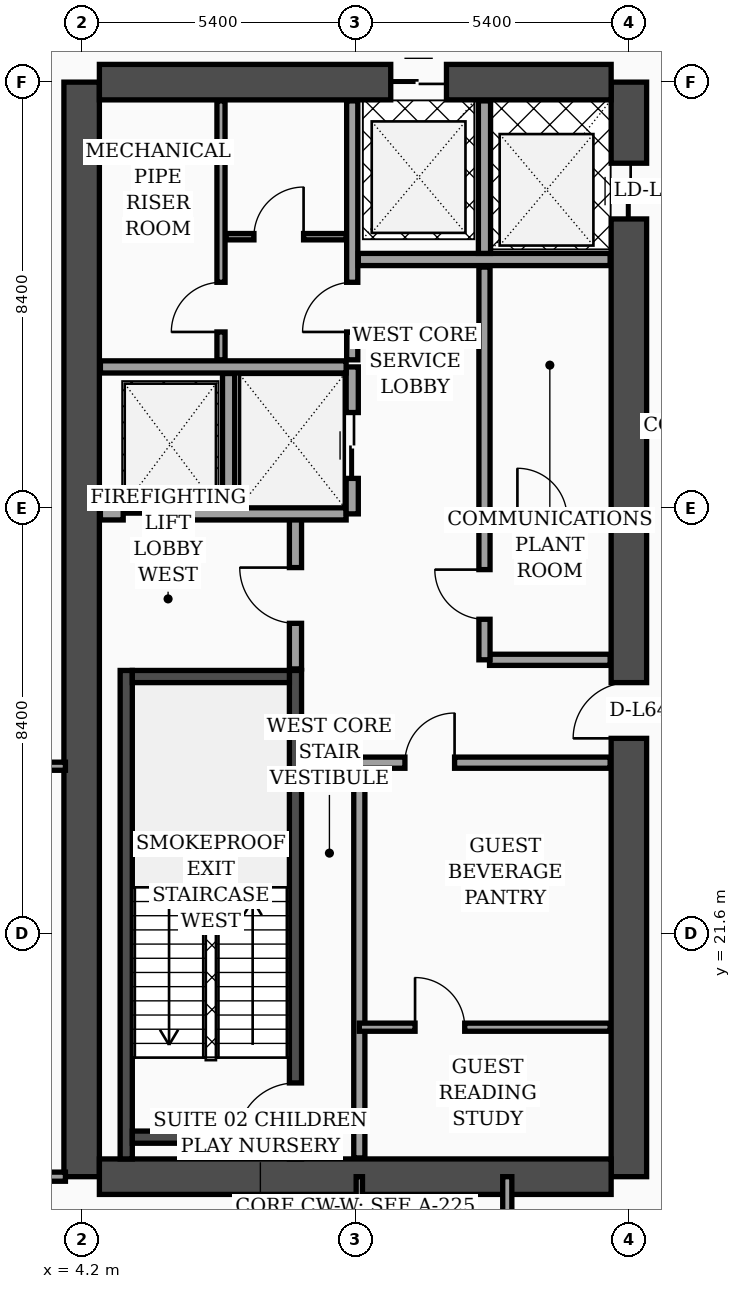
"""IFC4 building model, lengths in metres.
Left out: names, types, materials, properties, quantities, classifications, styles, units other than length and angle.
Written with IfcOpenShell. Run it as: python <this file> out.ifc"""

import sys

from ifc_helpers import new_model, si_unit, direction, frame, frame_2d, origin, place, context, subcontext, project, spatial, rectangle, extrude, element, fill, save


model = new_model("IFC4")
c1 = context("Model", 3, precision=1e-05, world=origin(), true_north=direction((0.0, 1.0)))
c2 = subcontext(c1, "Body", "Model", "MODEL_VIEW")
j1 = project(units=[si_unit("LENGTHUNIT", "METRE"), si_unit("PLANEANGLEUNIT", "RADIAN")], contexts=[c1])
p1 = place(None, origin())
s1 = spatial("IfcSite", under=j1, at=p1, CompositionType="ELEMENT")
p2 = place(p1, origin())
s2 = spatial("IfcBuilding", under=s1, at=p2, CompositionType="ELEMENT")
p3 = place(p2, frame((0.0, 0.0, 259.0)))
s3 = spatial("IfcBuildingStorey", under=s2, at=p3, CompositionType="ELEMENT", Elevation=259.0)
p4 = place(p3, frame((4.2, 16.8, 0.0), z_axis=(0.0, 0.0, 1.0), x_axis=(0.0, 1.0, 0.0)))
e1 = element("IfcWall", 1, at=p4, inside=s3, PredefinedType="SHEAR", context=c2, shape_type="SweptSolid", body=[
    extrude(rectangle(XDim=21.6, YDim=0.7, at=frame_2d((10.8, 0.0))), origin(), (0.0, 0.0, 1.0), 4.05),
])
p5 = place(p3, frame((15.0, 16.8, 0.0), z_axis=(0.0, 0.0, 1.0), x_axis=(0.0, 1.0, 0.0)))
e2 = element("IfcWall", 2, at=p5, inside=s3, PredefinedType="SHEAR", context=c2, shape_type="SweptSolid", body=[
    extrude(rectangle(XDim=21.6, YDim=0.7, at=frame_2d((10.8, 0.0))), origin(), (0.0, 0.0, 1.0), 4.05),
])
p6 = place(p5, frame((8.65, 0.0, 0.0)))
e3 = element("IfcOpeningElement", 3, at=p6, cuts=e2, PredefinedType="OPENING", context=c2, shape_type="SweptSolid", body=[
    extrude(rectangle(XDim=1.1, YDim=2.2, at=frame_2d((0.55, 1.1))), frame((0.0, 0.36, 0.0), z_axis=(0.0, -1.0, 0.0), x_axis=(1.0, 0.0, 0.0)), (0.0, 0.0, 1.0), 0.72),
])
p7 = place(p5, frame((18.9, 0.0, 0.0)))
e4 = element("IfcOpeningElement", 4, at=p7, cuts=e2, PredefinedType="OPENING", context=c2, shape_type="SweptSolid", body=[
    extrude(rectangle(XDim=1.1, YDim=2.2, at=frame_2d((0.55, 1.1))), frame((0.0, 0.36, 0.0), z_axis=(0.0, -1.0, 0.0), x_axis=(1.0, 0.0, 0.0)), (0.0, 0.0, 1.0), 0.72),
])
p8 = place(p3, frame((4.55, 38.4, 0.0), z_axis=(0.0, 0.0, 1.0), x_axis=(1.0, 0.0, 0.0)))
e5 = element("IfcWall", 5, at=p8, inside=s3, PredefinedType="SHEAR", context=c2, shape_type="SweptSolid", body=[
    extrude(rectangle(XDim=10.1, YDim=0.7, at=frame_2d((5.05, 0.0))), origin(), (0.0, 0.0, 1.0), 4.05),
])
p9 = place(p8, frame((5.75, 0.0, 0.0)))
e6 = element("IfcOpeningElement", 6, at=p9, cuts=e5, PredefinedType="OPENING", context=c2, shape_type="SweptSolid", body=[
    extrude(rectangle(XDim=1.1, YDim=2.2, at=frame_2d((0.55, 1.1))), frame((0.0, 0.36, 0.0), z_axis=(0.0, -1.0, 0.0), x_axis=(1.0, 0.0, 0.0)), (0.0, 0.0, 1.0), 0.72),
])
p10 = place(p3, frame((4.55, 16.8, 0.0), z_axis=(0.0, 0.0, 1.0), x_axis=(1.0, 0.0, 0.0)))
e7 = element("IfcWall", 7, at=p10, inside=s3, PredefinedType="SHEAR", context=c2, shape_type="SweptSolid", body=[
    extrude(rectangle(XDim=10.1, YDim=0.7, at=frame_2d((5.05, 0.0))), origin(), (0.0, 0.0, 1.0), 4.05),
])
p11 = place(p3, frame((5.08, 17.15, 0.0), z_axis=(0.0, 0.0, 1.0), x_axis=(0.0, 1.0, 0.0)))
e8 = element("IfcWall", 8, at=p11, inside=s3, PredefinedType="SOLIDWALL", context=c2, shape_type="SweptSolid", body=[
    extrude(rectangle(XDim=9.64, YDim=0.24, at=frame_2d((4.82, 0.0))), origin(), (0.0, 0.0, 1.0), 4.05),
])
p12 = place(p3, frame((8.42, 17.15, 0.0), z_axis=(0.0, 0.0, 1.0), x_axis=(0.0, 1.0, 0.0)))
e9 = element("IfcWall", 9, at=p12, inside=s3, PredefinedType="SOLIDWALL", context=c2, shape_type="SweptSolid", body=[
    extrude(rectangle(XDim=9.64, YDim=0.24, at=frame_2d((4.82, 0.0))), origin(), (0.0, 0.0, 1.0), 4.05),
])
p13 = place(p12, frame((0.35, 0.0, 0.0)))
e10 = element("IfcOpeningElement", 10, at=p13, cuts=e9, PredefinedType="OPENING", context=c2, shape_type="SweptSolid", body=[
    extrude(rectangle(XDim=1.15, YDim=2.2, at=frame_2d((0.575, 1.1))), frame((0.0, 0.13, 0.0), z_axis=(0.0, -1.0, 0.0), x_axis=(1.0, 0.0, 0.0)), (0.0, 0.0, 1.0), 0.26),
])
for number, where, z_axis, x_axis in (
    (11, (5.2, 17.58, 0.0), (0.0, 0.0, 1.0), (1.0, 0.0, 0.0)),
    (12, (5.2, 26.67, 0.0), (0.0, 0.0, 1.0), (1.0, 0.0, 0.0)),
):
    element("IfcWall", number, at=place(p3, frame(where, z_axis=z_axis, x_axis=x_axis)), inside=s3, PredefinedType="SOLIDWALL", context=c2, shape_type="SweptSolid", body=[
        extrude(rectangle(XDim=3.1, YDim=0.24, at=frame_2d((1.55, 0.0))), origin(), (0.0, 0.0, 1.0), 4.05),
    ])
p14 = place(p3, frame((8.42, 26.82, 0.0), z_axis=(0.0, 0.0, 1.0), x_axis=(0.0, 1.0, 0.0)))
e13 = element("IfcWall", 13, at=p14, inside=s3, PredefinedType="SOLIDWALL", context=c2, shape_type="SweptSolid", body=[
    extrude(rectangle(XDim=3.0, YDim=0.24, at=frame_2d((1.5, 0.0))), origin(), (0.0, 0.0, 1.0), 4.05),
])
p15 = place(p14, frame((0.9, 0.0, 0.0)))
e14 = element("IfcOpeningElement", 14, at=p15, cuts=e13, PredefinedType="OPENING", context=c2, shape_type="SweptSolid", body=[
    extrude(rectangle(XDim=1.1, YDim=2.2, at=frame_2d((0.55, 1.1))), frame((0.0, 0.13, 0.0), z_axis=(0.0, -1.0, 0.0), x_axis=(1.0, 0.0, 0.0)), (0.0, 0.0, 1.0), 0.26),
])
p16 = place(p3, frame((4.57, 29.88, 0.0), z_axis=(0.0, 0.0, 1.0), x_axis=(1.0, 0.0, 0.0)))
e15 = element("IfcWall", 15, at=p16, inside=s3, PredefinedType="SOLIDWALL", context=c2, shape_type="SweptSolid", body=[
    extrude(rectangle(XDim=4.85, YDim=0.24, at=frame_2d((2.425, 0.0))), origin(), (0.0, 0.0, 1.0), 4.05),
])
p17 = place(p16, frame((0.45, 0.0, 0.0)))
e16 = element("IfcOpeningElement", 16, at=p17, cuts=e15, PredefinedType="OPENING", context=c2, shape_type="SweptSolid", body=[
    extrude(rectangle(XDim=1.3, YDim=2.35, at=frame_2d((0.65, 1.175))), frame((0.0, 0.13, 0.0), z_axis=(0.0, -1.0, 0.0), x_axis=(1.0, 0.0, 0.0)), (0.0, 0.0, 1.0), 0.26),
])
p18 = place(p3, frame((7.1, 30.02, 0.0), z_axis=(0.0, 0.0, 1.0), x_axis=(0.0, 1.0, 0.0)))
e17 = element("IfcWall", 17, at=p18, inside=s3, PredefinedType="SOLIDWALL", context=c2, shape_type="SweptSolid", body=[
    extrude(rectangle(XDim=2.63, YDim=0.24, at=frame_2d((1.315, 0.0))), origin(), (0.0, 0.0, 1.0), 4.05),
])
p19 = place(p3, frame((9.54, 29.88, 0.0), z_axis=(0.0, 0.0, 1.0), x_axis=(0.0, 1.0, 0.0)))
e18 = element("IfcWall", 18, at=p19, inside=s3, PredefinedType="SOLIDWALL", context=c2, shape_type="SweptSolid", body=[
    extrude(rectangle(XDim=2.9, YDim=0.24, at=frame_2d((1.45, 0.0))), origin(), (0.0, 0.0, 1.0), 4.05),
])
p20 = place(p19, frame((0.7, 0.0, 0.0)))
e19 = element("IfcOpeningElement", 19, at=p20, cuts=e18, PredefinedType="OPENING", context=c2, shape_type="SweptSolid", body=[
    extrude(rectangle(XDim=1.3, YDim=2.35, at=frame_2d((0.65, 1.175))), frame((0.0, 0.13, 0.0), z_axis=(0.0, -1.0, 0.0), x_axis=(1.0, 0.0, 0.0)), (0.0, 0.0, 1.0), 0.26),
])
p21 = place(p3, frame((4.57, 32.78, 0.0), z_axis=(0.0, 0.0, 1.0), x_axis=(1.0, 0.0, 0.0)))
e20 = element("IfcWall", 20, at=p21, inside=s3, PredefinedType="SOLIDWALL", context=c2, shape_type="SweptSolid", body=[
    extrude(rectangle(XDim=4.85, YDim=0.24, at=frame_2d((2.425, 0.0))), origin(), (0.0, 0.0, 1.0), 3.7),
])
p22 = place(p3, frame((9.68, 17.17, 0.0), z_axis=(0.0, 0.0, 1.0), x_axis=(0.0, 1.0, 0.0)))
e21 = element("IfcWall", 21, at=p22, inside=s3, PredefinedType="SOLIDWALL", context=c2, shape_type="SweptSolid", body=[
    extrude(rectangle(XDim=7.83, YDim=0.22, at=frame_2d((3.915, 0.0))), origin(), (0.0, 0.0, 1.0), 4.05),
])
p23 = place(p3, frame((6.95, 32.92, 0.0), z_axis=(0.0, 0.0, 1.0), x_axis=(0.0, 1.0, 0.0)))
e22 = element("IfcWall", 22, at=p23, inside=s3, PredefinedType="PARTITIONING", context=c2, shape_type="SweptSolid", body=[
    extrude(rectangle(XDim=5.11, YDim=0.16, at=frame_2d((2.555, 0.0))), origin(), (0.0, 0.0, 1.0), 4.05),
])
p24 = place(p23, frame((0.55, 0.0, 0.0)))
e23 = element("IfcOpeningElement", 23, at=p24, cuts=e22, PredefinedType="OPENING", context=c2, shape_type="SweptSolid", body=[
    extrude(rectangle(XDim=0.98, YDim=2.15, at=frame_2d((0.49, 1.075))), frame((0.0, 0.09, 0.0), z_axis=(0.0, -1.0, 0.0), x_axis=(1.0, 0.0, 0.0)), (0.0, 0.0, 1.0), 0.18),
])
p25 = place(p3, frame((7.05, 35.35, 0.0), z_axis=(0.0, 0.0, 1.0), x_axis=(1.0, 0.0, 0.0)))
e24 = element("IfcWall", 24, at=p25, inside=s3, PredefinedType="PARTITIONING", context=c2, shape_type="SweptSolid", body=[
    extrude(rectangle(XDim=2.37, YDim=0.125, at=frame_2d((1.185, 0.0))), origin(), (0.0, 0.0, 1.0), 4.05),
])
p26 = place(p25, frame((0.55, 0.0, 0.0)))
e25 = element("IfcOpeningElement", 25, at=p26, cuts=e24, PredefinedType="OPENING", context=c2, shape_type="SweptSolid", body=[
    extrude(rectangle(XDim=0.98, YDim=2.15, at=frame_2d((0.49, 1.075))), frame((0.0, 0.073, 0.0), z_axis=(0.0, -1.0, 0.0), x_axis=(1.0, 0.0, 0.0)), (0.0, 0.0, 1.0), 0.145),
])
p27 = place(p3, frame((9.54, 32.92, 0.0), z_axis=(0.0, 0.0, 1.0), x_axis=(0.0, 1.0, 0.0)))
e26 = element("IfcWall", 26, at=p27, inside=s3, PredefinedType="SOLIDWALL", context=c2, shape_type="SweptSolid", body=[
    extrude(rectangle(XDim=5.11, YDim=0.22, at=frame_2d((2.555, 0.0))), origin(), (0.0, 0.0, 1.0), 4.05),
])
p28 = place(p27, frame((0.55, 0.0, 0.0)))
e27 = element("IfcOpeningElement", 27, at=p28, cuts=e26, PredefinedType="OPENING", context=c2, shape_type="SweptSolid", body=[
    extrude(rectangle(XDim=0.98, YDim=2.15, at=frame_2d((0.49, 1.075))), frame((0.0, 0.12, 0.0), z_axis=(0.0, -1.0, 0.0), x_axis=(1.0, 0.0, 0.0)), (0.0, 0.0, 1.0), 0.24),
])
p29 = place(p3, frame((9.68, 19.75, 0.0), z_axis=(0.0, 0.0, 1.0), x_axis=(1.0, 0.0, 0.0)))
e28 = element("IfcWall", 28, at=p29, inside=s3, PredefinedType="PARTITIONING", context=c2, shape_type="SweptSolid", body=[
    extrude(rectangle(XDim=4.95, YDim=0.16, at=frame_2d((2.475, 0.0))), origin(), (0.0, 0.0, 1.0), 4.05),
])
p30 = place(p29, frame((1.1, 0.0, 0.0)))
e29 = element("IfcOpeningElement", 29, at=p30, cuts=e28, PredefinedType="OPENING", context=c2, shape_type="SweptSolid", body=[
    extrude(rectangle(XDim=0.98, YDim=2.15, at=frame_2d((0.49, 1.075))), frame((0.0, 0.09, 0.0), z_axis=(0.0, -1.0, 0.0), x_axis=(1.0, 0.0, 0.0)), (0.0, 0.0, 1.0), 0.18),
])
p31 = place(p3, frame((9.68, 24.97, 0.0), z_axis=(0.0, 0.0, 1.0), x_axis=(1.0, 0.0, 0.0)))
e30 = element("IfcWall", 30, at=p31, inside=s3, PredefinedType="SOLIDWALL", context=c2, shape_type="SweptSolid", body=[
    extrude(rectangle(XDim=4.95, YDim=0.22, at=frame_2d((2.475, 0.0))), origin(), (0.0, 0.0, 1.0), 3.5),
])
p32 = place(p31, frame((0.9, 0.0, 0.0)))
e31 = element("IfcOpeningElement", 31, at=p32, cuts=e30, PredefinedType="OPENING", context=c2, shape_type="SweptSolid", body=[
    extrude(rectangle(XDim=0.98, YDim=2.15, at=frame_2d((0.49, 1.075))), frame((0.0, 0.12, 0.0), z_axis=(0.0, -1.0, 0.0), x_axis=(1.0, 0.0, 0.0)), (0.0, 0.0, 1.0), 0.24),
])
p33 = place(p3, frame((12.25, 27.0, 0.0), z_axis=(0.0, 0.0, 1.0), x_axis=(1.0, 0.0, 0.0)))
e32 = element("IfcWall", 32, at=p33, inside=s3, PredefinedType="SOLIDWALL", context=c2, shape_type="SweptSolid", body=[
    extrude(rectangle(XDim=2.38, YDim=0.22, at=frame_2d((1.19, 0.0))), origin(), (0.0, 0.0, 1.0), 4.05),
])
p34 = place(p3, frame((12.15, 27.0, 0.0), z_axis=(0.0, 0.0, 1.0), x_axis=(0.0, 1.0, 0.0)))
e33 = element("IfcWall", 33, at=p34, inside=s3, PredefinedType="SOLIDWALL", context=c2, shape_type="SweptSolid", body=[
    extrude(rectangle(XDim=7.75, YDim=0.22, at=frame_2d((3.875, 0.0))), origin(), (0.0, 0.0, 1.0), 4.05),
])
p35 = place(p34, frame((0.8, 0.0, 0.0)))
e34 = element("IfcOpeningElement", 34, at=p35, cuts=e33, PredefinedType="OPENING", context=c2, shape_type="SweptSolid", body=[
    extrude(rectangle(XDim=0.98, YDim=2.15, at=frame_2d((0.49, 1.075))), frame((0.0, 0.12, 0.0), z_axis=(0.0, -1.0, 0.0), x_axis=(1.0, 0.0, 0.0)), (0.0, 0.0, 1.0), 0.24),
])
p36 = place(p3, frame((12.25, 29.8, 0.0), z_axis=(0.0, 0.0, 1.0), x_axis=(1.0, 0.0, 0.0)))
e35 = element("IfcWall", 35, at=p36, inside=s3, PredefinedType="PARTITIONING", context=c2, shape_type="SweptSolid", body=[
    extrude(rectangle(XDim=2.38, YDim=0.16, at=frame_2d((1.19, 0.0))), origin(), (0.0, 0.0, 1.0), 4.05),
])
p37 = place(p36, frame((0.55, 0.0, 0.0)))
e36 = element("IfcOpeningElement", 36, at=p37, cuts=e35, PredefinedType="OPENING", context=c2, shape_type="SweptSolid", body=[
    extrude(rectangle(XDim=0.98, YDim=2.15, at=frame_2d((0.49, 1.075))), frame((0.0, 0.09, 0.0), z_axis=(0.0, -1.0, 0.0), x_axis=(1.0, 0.0, 0.0)), (0.0, 0.0, 1.0), 0.18),
])
p38 = place(p3, frame((9.66, 34.9, 0.0), z_axis=(0.0, 0.0, 1.0), x_axis=(1.0, 0.0, 0.0)))
e37 = element("IfcWall", 37, at=p38, inside=s3, PredefinedType="SOLIDWALL", context=c2, shape_type="SweptSolid", body=[
    extrude(rectangle(XDim=4.97, YDim=0.24, at=frame_2d((2.485, 0.0))), origin(), (0.0, 0.0, 1.0), 4.05),
])
p39 = place(p3, frame((12.15, 35.02, 0.0), z_axis=(0.0, 0.0, 1.0), x_axis=(0.0, 1.0, 0.0)))
e38 = element("IfcWall", 38, at=p39, inside=s3, PredefinedType="SOLIDWALL", context=c2, shape_type="SweptSolid", body=[
    extrude(rectangle(XDim=3.01, YDim=0.24, at=frame_2d((1.505, 0.0))), origin(), (0.0, 0.0, 1.0), 4.05),
])
p40 = place(p3, frame((0.08, 24.9, 0.0), z_axis=(0.0, 0.0, 1.0), x_axis=(1.0, 0.0, 0.0)))
e39 = element("IfcWall", 39, at=p40, inside=s3, PredefinedType="PARTITIONING", context=c2, shape_type="SweptSolid", body=[
    extrude(rectangle(XDim=3.8, YDim=0.16, at=frame_2d((1.9, 0.0))), origin(), (0.0, 0.0, 1.0), 3.6),
])
p41 = place(p40, frame((1.35, 0.0, 0.0)))
e40 = element("IfcOpeningElement", 40, at=p41, cuts=e39, PredefinedType="OPENING", context=c2, shape_type="SweptSolid", body=[
    extrude(rectangle(XDim=0.96, YDim=2.2, at=frame_2d((0.48, 1.1))), frame((0.0, 0.09, 0.0), z_axis=(0.0, -1.0, 0.0), x_axis=(1.0, 0.0, 0.0)), (0.0, 0.0, 1.0), 0.18),
])
p42 = place(p3, frame((0.08, 16.8, 0.0), z_axis=(0.0, 0.0, 1.0), x_axis=(1.0, 0.0, 0.0)))
e41 = element("IfcWall", 41, at=p42, inside=s3, PredefinedType="PARTITIONING", context=c2, shape_type="SweptSolid", body=[
    extrude(rectangle(XDim=3.8, YDim=0.18, at=frame_2d((1.9, 0.0))), origin(), (0.0, 0.0, 1.0), 3.5),
])
p43 = place(p3, frame((9.68, 14.75, 0.0), z_axis=(0.0, 0.0, 1.0), x_axis=(0.0, 1.0, 0.0)))
e42 = element("IfcWall", 42, at=p43, inside=s3, PredefinedType="PARTITIONING", context=c2, shape_type="SweptSolid", body=[
    extrude(rectangle(XDim=2.05, YDim=0.125, at=frame_2d((1.025, 0.0))), origin(), (0.0, 0.0, 1.0), 4.05),
])
p44 = place(p3, frame((12.6, 2.44, 0.0), z_axis=(0.0, 0.0, 1.0), x_axis=(0.0, 1.0, 0.0)))
e43 = element("IfcWall", 43, at=p44, inside=s3, PredefinedType="PARTITIONING", context=c2, shape_type="SweptSolid", body=[
    extrude(rectangle(XDim=14.36, YDim=0.18, at=frame_2d((7.18, 0.0))), origin(), (0.0, 0.0, 1.0), 2.35),
])
p45 = place(p44, frame((3.01, 0.0, 0.0)))
e44 = element("IfcOpeningElement", 44, at=p45, cuts=e43, PredefinedType="OPENING", context=c2, shape_type="SweptSolid", body=[
    extrude(rectangle(XDim=1.02, YDim=2.2, at=frame_2d((0.51, 1.1))), frame((0.0, 0.1, 0.0), z_axis=(0.0, -1.0, 0.0), x_axis=(1.0, 0.0, 0.0)), (0.0, 0.0, 1.0), 0.2),
])
p46 = place(p44, frame((9.95, 0.0, 0.0)))
e45 = element("IfcOpeningElement", 45, at=p46, cuts=e43, PredefinedType="OPENING", context=c2, shape_type="SweptSolid", body=[
    extrude(rectangle(XDim=1.02, YDim=2.2, at=frame_2d((0.51, 1.1))), frame((0.0, 0.1, 0.0), z_axis=(0.0, -1.0, 0.0), x_axis=(1.0, 0.0, 0.0)), (0.0, 0.0, 1.0), 0.2),
])
p47 = place(p15, origin())
e46 = element("IfcDoor", 46, at=p47, inside=s3, OperationType="SINGLE_SWING_RIGHT", PredefinedType="DOOR", context=c2, shape_type="SweptSolid", body=[
    extrude(rectangle(XDim=1.1, YDim=2.2, at=frame_2d((0.55, 1.1))), frame((0.0, 0.025, 0.0), z_axis=(0.0, -1.0, 0.0), x_axis=(1.0, 0.0, 0.0)), (0.0, 0.0, 1.0), 0.05),
])
fill(e14, e46)
p48 = place(p17, origin())
e47 = element("IfcDoor", 47, at=p48, inside=s3, OperationType="DOUBLE_DOOR_SLIDING", PredefinedType="DOOR", context=c2, shape_type="SweptSolid", body=[
    extrude(rectangle(XDim=1.3, YDim=2.35, at=frame_2d((0.65, 1.175))), frame((0.0, 0.025, 0.0), z_axis=(0.0, -1.0, 0.0), x_axis=(1.0, 0.0, 0.0)), (0.0, 0.0, 1.0), 0.05),
])
fill(e16, e47)
p49 = place(p20, origin())
e48 = element("IfcDoor", 48, at=p49, inside=s3, OperationType="DOUBLE_DOOR_SLIDING", PredefinedType="DOOR", context=c2, shape_type="SweptSolid", body=[
    extrude(rectangle(XDim=1.3, YDim=2.35, at=frame_2d((0.65, 1.175))), frame((0.0, 0.025, 0.0), z_axis=(0.0, -1.0, 0.0), x_axis=(1.0, 0.0, 0.0)), (0.0, 0.0, 1.0), 0.05),
])
fill(e19, e48)
p50 = place(p24, origin())
e49 = element("IfcDoor", 49, at=p50, inside=s3, OperationType="SINGLE_SWING_LEFT", PredefinedType="DOOR", context=c2, shape_type="SweptSolid", body=[
    extrude(rectangle(XDim=0.98, YDim=2.15, at=frame_2d((0.49, 1.075))), frame((0.0, 0.025, 0.0), z_axis=(0.0, -1.0, 0.0), x_axis=(1.0, 0.0, 0.0)), (0.0, 0.0, 1.0), 0.05),
])
fill(e23, e49)
p51 = place(p26, origin())
e50 = element("IfcDoor", 50, at=p51, inside=s3, OperationType="SINGLE_SWING_RIGHT", PredefinedType="DOOR", context=c2, shape_type="SweptSolid", body=[
    extrude(rectangle(XDim=0.98, YDim=2.15, at=frame_2d((0.49, 1.075))), frame((0.0, 0.025, 0.0), z_axis=(0.0, -1.0, 0.0), x_axis=(1.0, 0.0, 0.0)), (0.0, 0.0, 1.0), 0.05),
])
fill(e25, e50)
p52 = place(p28, origin())
e51 = element("IfcDoor", 51, at=p52, inside=s3, OperationType="SINGLE_SWING_LEFT", PredefinedType="DOOR", context=c2, shape_type="SweptSolid", body=[
    extrude(rectangle(XDim=0.98, YDim=2.15, at=frame_2d((0.49, 1.075))), frame((0.0, 0.025, 0.0), z_axis=(0.0, -1.0, 0.0), x_axis=(1.0, 0.0, 0.0)), (0.0, 0.0, 1.0), 0.05),
])
fill(e27, e51)
p53 = place(p30, origin())
e52 = element("IfcDoor", 52, at=p53, inside=s3, OperationType="SINGLE_SWING_LEFT", PredefinedType="DOOR", context=c2, shape_type="SweptSolid", body=[
    extrude(rectangle(XDim=0.98, YDim=2.15, at=frame_2d((0.49, 1.075))), frame((0.0, 0.025, 0.0), z_axis=(0.0, -1.0, 0.0), x_axis=(1.0, 0.0, 0.0)), (0.0, 0.0, 1.0), 0.05),
])
fill(e29, e52)
p54 = place(p32, origin())
e53 = element("IfcDoor", 53, at=p54, inside=s3, OperationType="SINGLE_SWING_RIGHT", PredefinedType="DOOR", context=c2, shape_type="SweptSolid", body=[
    extrude(rectangle(XDim=0.98, YDim=2.15, at=frame_2d((0.49, 1.075))), frame((0.0, 0.025, 0.0), z_axis=(0.0, -1.0, 0.0), x_axis=(1.0, 0.0, 0.0)), (0.0, 0.0, 1.0), 0.05),
])
fill(e31, e53)
p55 = place(p35, origin())
e54 = element("IfcDoor", 54, at=p55, inside=s3, OperationType="SINGLE_SWING_RIGHT", PredefinedType="DOOR", context=c2, shape_type="SweptSolid", body=[
    extrude(rectangle(XDim=0.98, YDim=2.15, at=frame_2d((0.49, 1.075))), frame((0.0, 0.025, 0.0), z_axis=(0.0, -1.0, 0.0), x_axis=(1.0, 0.0, 0.0)), (0.0, 0.0, 1.0), 0.05),
])
fill(e34, e54)
p56 = place(p37, origin())
e55 = element("IfcDoor", 55, at=p56, inside=s3, OperationType="SINGLE_SWING_LEFT", PredefinedType="DOOR", context=c2, shape_type="SweptSolid", body=[
    extrude(rectangle(XDim=0.98, YDim=2.15, at=frame_2d((0.49, 1.075))), frame((0.0, 0.025, 0.0), z_axis=(0.0, -1.0, 0.0), x_axis=(1.0, 0.0, 0.0)), (0.0, 0.0, 1.0), 0.05),
])
fill(e36, e55)
p57 = place(p13, origin())
e56 = element("IfcDoor", 56, at=p57, inside=s3, OperationType="SINGLE_SWING_LEFT", PredefinedType="DOOR", context=c2, shape_type="SweptSolid", body=[
    extrude(rectangle(XDim=1.15, YDim=2.2, at=frame_2d((0.575, 1.1))), frame((0.0, 0.025, 0.0), z_axis=(0.0, -1.0, 0.0), x_axis=(1.0, 0.0, 0.0)), (0.0, 0.0, 1.0), 0.05),
])
fill(e10, e56)
p58 = place(p6, origin())
e57 = element("IfcDoor", 57, at=p58, inside=s3, OperationType="SINGLE_SWING_LEFT", PredefinedType="DOOR", context=c2, shape_type="SweptSolid", body=[
    extrude(rectangle(XDim=1.1, YDim=2.2, at=frame_2d((0.55, 1.1))), frame((0.0, 0.025, 0.0), z_axis=(0.0, -1.0, 0.0), x_axis=(1.0, 0.0, 0.0)), (0.0, 0.0, 1.0), 0.05),
])
fill(e3, e57)
p59 = place(p7, origin())
e58 = element("IfcDoor", 58, at=p59, inside=s3, OperationType="DOUBLE_DOOR_SLIDING", PredefinedType="DOOR", context=c2, shape_type="SweptSolid", body=[
    extrude(rectangle(XDim=1.1, YDim=2.2, at=frame_2d((0.55, 1.1))), frame((0.0, 0.025, 0.0), z_axis=(0.0, -1.0, 0.0), x_axis=(1.0, 0.0, 0.0)), (0.0, 0.0, 1.0), 0.05),
])
fill(e4, e58)
p60 = place(p9, origin())
e59 = element("IfcDoor", 59, at=p60, inside=s3, OperationType="DOUBLE_DOOR_SLIDING", PredefinedType="DOOR", context=c2, shape_type="SweptSolid", body=[
    extrude(rectangle(XDim=1.1, YDim=2.2, at=frame_2d((0.55, 1.1))), frame((0.0, 0.025, 0.0), z_axis=(0.0, -1.0, 0.0), x_axis=(1.0, 0.0, 0.0)), (0.0, 0.0, 1.0), 0.05),
])
fill(e6, e59)
save(model, sys.argv[1])
